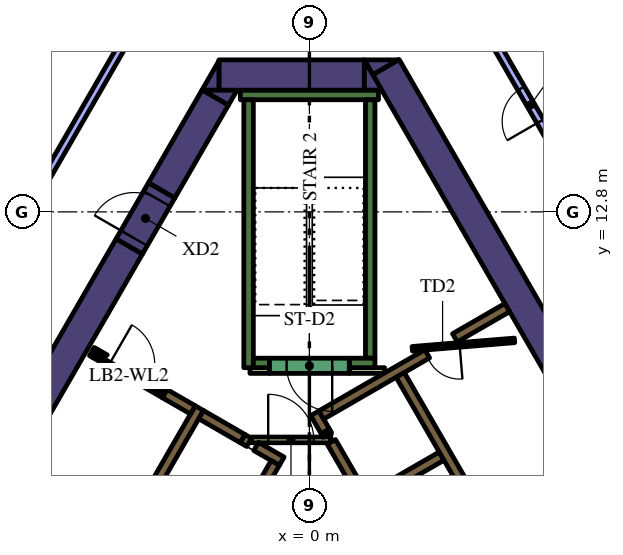
"""IFC4 building model, lengths in metres.
Left out: names, types, materials, properties, quantities, classifications, styles, units other than length and angle.
Written with IfcOpenShell. Run it as: python <this file> out.ifc"""

import sys

from ifc_helpers import new_model, si_unit, direction, frame, frame_2d, origin, place, context, subcontext, project, spatial, polyline, rectangle, outline, extrude, element, fill, save


model = new_model("IFC4")
c1 = context("Model", 3, precision=1e-05, world=origin(), true_north=direction((0.0, 1.0)))
c2 = subcontext(c1, "Body", "Model", "MODEL_VIEW")
j1 = project(units=[si_unit("LENGTHUNIT", "METRE"), si_unit("PLANEANGLEUNIT", "RADIAN")], contexts=[c1])
p1 = place(None, origin())
s1 = spatial("IfcSite", under=j1, at=p1, CompositionType="ELEMENT")
p2 = place(p1, origin())
s2 = spatial("IfcBuilding", under=s1, at=p2, CompositionType="ELEMENT")
p3 = place(p2, frame((0.0, 0.0, 175.2)))
s3 = spatial("IfcBuildingStorey", under=s2, at=p3, CompositionType="ELEMENT", Elevation=175.2)
p4 = place(p3, frame((8.279, 5.761, 0.0), z_axis=(0.0, 0.0, 1.0), x_axis=(-0.500010359015, 0.866019422922, 0.0)))
e1 = element("IfcWall", 1, at=p4, inside=s3, PredefinedType="SOLIDWALL", context=c2, shape_type="SweptSolid", body=[
    extrude(rectangle(XDim=12.528, YDim=0.8, at=frame_2d((6.264, 0.0))), origin(), (0.0, 0.0, 1.0), 4.2),
])
p5 = place(p3, origin())
e2 = element("IfcWall", 2, at=p5, inside=s3, PredefinedType="SOLIDWALL", context=c2, shape_type="SweptSolid", body=[
    extrude(outline(polyline([(1.443, 16.8), (2.339, 16.8), (1.667, 16.412), (1.443, 16.8)])), origin(), (0.0, 0.0, 1.0), 4.2),
])
p6 = place(p3, frame((-2.379, 16.4, 0.0), z_axis=(0.0, 0.0, 1.0), x_axis=(1.0, 0.0, 0.0)))
e3 = element("IfcWall", 3, at=p6, inside=s3, PredefinedType="SOLIDWALL", context=c2, shape_type="SweptSolid", body=[
    extrude(rectangle(XDim=3.824, YDim=0.8, at=frame_2d((1.912, 0.0))), origin(), (0.0, 0.0, 1.0), 4.2),
])
e4 = element("IfcWall", 4, at=p5, inside=s3, PredefinedType="SOLIDWALL", context=c2, shape_type="SweptSolid", body=[
    extrude(outline(polyline([(1.905, 16.0), (1.447, 16.0), (1.447, 16.793), (1.905, 16.0)])), origin(), (0.0, 0.0, 1.0), 4.2),
])
e5 = element("IfcWall", 5, at=p5, inside=s3, PredefinedType="SOLIDWALL", context=c2, shape_type="SweptSolid", body=[
    extrude(outline(polyline([(-2.829, 16.0), (-2.381, 16.776), (-2.381, 16.0), (-2.829, 16.0)])), origin(), (0.0, 0.0, 1.0), 4.2),
])
p7 = place(p3, frame((-2.477, 15.81, 0.0), z_axis=(0.0, 0.0, 1.0), x_axis=(-0.499969377405, -0.866043083026, 0.0)))
e6 = element("IfcWall", 6, at=p7, inside=s3, PredefinedType="SOLIDWALL", context=c2, shape_type="SweptSolid", body=[
    extrude(rectangle(XDim=2.824, YDim=0.8, at=frame_2d((1.412, 0.0))), origin(), (0.0, 0.0, 1.0), 4.2),
])
e7 = element("IfcWall", 7, at=p5, inside=s3, PredefinedType="SOLIDWALL", context=c2, shape_type="SweptSolid", body=[
    extrude(outline(polyline([(-1.905, 16.0), (-2.129, 15.612), (-2.801, 16.0), (-1.905, 16.0)])), origin(), (0.0, 0.0, 1.0), 4.2),
])
p8 = place(p3, frame((-12.668, -1.842, 0.0), z_axis=(0.0, 0.0, 1.0), x_axis=(0.500003640647, 0.866023301845, 0.0)))
e8 = element("IfcWall", 8, at=p8, inside=s3, PredefinedType="SOLIDWALL", context=c2, shape_type="SweptSolid", body=[
    extrude(rectangle(XDim=15.858, YDim=0.8, at=frame_2d((7.929, 0.0))), origin(), (0.0, 0.0, 1.0), 4.2),
])
p9 = place(p3, frame((-1.817, 15.875, 0.0), z_axis=(0.0, 0.0, 1.0), x_axis=(1.0, 0.0, 0.0)))
e9 = element("IfcWall", 9, at=p9, inside=s3, PredefinedType="SOLIDWALL", context=c2, shape_type="SweptSolid", body=[
    extrude(rectangle(XDim=3.634, YDim=0.25, at=frame_2d((1.817, 0.0))), origin(), (0.0, 0.0, 1.0), 4.2),
])
p10 = place(p3, frame((1.6, 8.95, 0.0), z_axis=(0.0, 0.0, 1.0), x_axis=(0.0, 1.0, 0.0)))
e10 = element("IfcWall", 10, at=p10, inside=s3, PredefinedType="SOLIDWALL", context=c2, shape_type="SweptSolid", body=[
    extrude(rectangle(XDim=6.8, YDim=0.25, at=frame_2d((3.4, 0.0))), origin(), (0.0, 0.0, 1.0), 4.2),
])
p11 = place(p3, frame((1.05, 8.825, 0.0), z_axis=(0.0, 0.0, 1.0), x_axis=(1.0, 0.0, 0.0)))
e11 = element("IfcWall", 11, at=p11, inside=s3, PredefinedType="SOLIDWALL", context=c2, shape_type="SweptSolid", body=[
    extrude(rectangle(XDim=0.675, YDim=0.25, at=frame_2d((0.337, 0.0))), origin(), (0.0, 0.0, 1.0), 4.2),
])
p12 = place(p3, frame((-1.6, 8.7, 0.0), z_axis=(0.0, 0.0, 1.0), x_axis=(0.0, 1.0, 0.0)))
e12 = element("IfcWall", 12, at=p12, inside=s3, PredefinedType="SOLIDWALL", context=c2, shape_type="SweptSolid", body=[
    extrude(rectangle(XDim=7.05, YDim=0.25, at=frame_2d((3.525, 0.0))), origin(), (0.0, 0.0, 1.0), 4.2),
])
p13 = place(p3, frame((-1.475, 8.825, 0.0), z_axis=(0.0, 0.0, 1.0), x_axis=(1.0, 0.0, 0.0)))
e13 = element("IfcWall", 13, at=p13, inside=s3, PredefinedType="SOLIDWALL", context=c2, shape_type="SweptSolid", body=[
    extrude(rectangle(XDim=0.425, YDim=0.25, at=frame_2d((0.212, 0.0))), origin(), (0.0, 0.0, 1.0), 4.2),
])
p14 = place(p3, frame((0.473, 6.93, 0.0), z_axis=(0.0, 0.0, 1.0), x_axis=(-0.49972245349, 0.866185586049, 0.0)))
e14 = element("IfcWall", 14, at=p14, inside=s3, PredefinedType="SOLIDWALL", context=c2, shape_type="SweptSolid", body=[
    extrude(rectangle(XDim=0.11, YDim=0.25, at=frame_2d((0.055, 0.0))), origin(), (0.0, 0.0, 1.0), 4.2),
])
p15 = place(p3, frame((6.568, -3.627, 0.0), z_axis=(0.0, 0.0, 1.0), x_axis=(-0.499999455981, 0.866025717874, 0.0)))
e15 = element("IfcWall", 15, at=p15, inside=s3, PredefinedType="SOLIDWALL", context=c2, shape_type="SweptSolid", body=[
    extrude(rectangle(XDim=11.978, YDim=0.25, at=frame_2d((5.989, 0.0))), origin(), (0.0, 0.0, 1.0), 4.2),
])
p16 = place(p3, frame((0.417, 7.027, 0.0), z_axis=(0.0, 0.0, 1.0), x_axis=(-0.500210807569, 0.865903659763, 0.0)))
e16 = element("IfcWall", 16, at=p16, inside=s3, PredefinedType="SOLIDWALL", context=c2, shape_type="SweptSolid", body=[
    extrude(rectangle(XDim=0.548, YDim=0.25, at=frame_2d((0.274, 0.0))), origin(), (0.0, 0.0, 1.0), 4.2),
])
p17 = place(p3, frame((3.1, 9.064, 0.0), z_axis=(0.0, 0.0, 1.0), x_axis=(-0.866030133475, -0.499991807846, 0.0)))
e17 = element("IfcWall", 17, at=p17, inside=s3, PredefinedType="SOLIDWALL", context=c2, shape_type="SweptSolid", body=[
    extrude(rectangle(XDim=3.217, YDim=0.25, at=frame_2d((1.608, 0.0))), origin(), (0.0, 0.0, 1.0), 4.2),
])
p18 = place(p3, frame((1.574, 5.274, 0.0), z_axis=(0.0, 0.0, 1.0), x_axis=(0.866028486751, 0.499994660107, 0.0)))
e18 = element("IfcWall", 18, at=p18, inside=s3, PredefinedType="SOLIDWALL", context=c2, shape_type="SweptSolid", body=[
    extrude(rectangle(XDim=2.2, YDim=0.25, at=frame_2d((1.1, 0.0))), origin(), (0.0, 0.0, 1.0), 4.2),
])
p19 = place(p3, frame((3.83, 9.486, 0.0), z_axis=(0.0, 0.0, 1.0), x_axis=(0.865986202621, 0.500067892261, 0.0)))
e19 = element("IfcWall", 19, at=p19, inside=s3, PredefinedType="SOLIDWALL", context=c2, shape_type="SweptSolid", body=[
    extrude(rectangle(XDim=1.591, YDim=0.25, at=frame_2d((0.795, 0.0))), origin(), (0.0, 0.0, 1.0), 4.2),
])
p20 = place(p3, frame((-8.06, -1.311, 0.0), z_axis=(0.0, 0.0, 1.0), x_axis=(0.50000273126, 0.866023826885, 0.0)))
e20 = element("IfcWall", 20, at=p20, inside=s3, PredefinedType="SOLIDWALL", context=c2, shape_type="SweptSolid", body=[
    extrude(rectangle(XDim=10.33, YDim=0.25, at=frame_2d((5.165, 0.0))), origin(), (0.0, 0.0, 1.0), 4.2),
])
p21 = place(p3, frame((-1.758, 6.835, 0.0), z_axis=(0.0, 0.0, 1.0), x_axis=(0.865982457891, -0.500074377092, 0.0)))
e21 = element("IfcWall", 21, at=p21, inside=s3, PredefinedType="SOLIDWALL", context=c2, shape_type="SweptSolid", body=[
    extrude(rectangle(XDim=0.2, YDim=0.25, at=frame_2d((0.1, 0.0))), origin(), (0.0, 0.0, 1.0), 4.2),
])
p22 = place(p3, frame((-1.76, 6.836, 0.0), z_axis=(0.0, 0.0, 1.0), x_axis=(-0.865952863304, 0.500125622755, 0.0)))
e22 = element("IfcWall", 22, at=p22, inside=s3, PredefinedType="SOLIDWALL", context=c2, shape_type="SweptSolid", body=[
    extrude(rectangle(XDim=1.258, YDim=0.25, at=frame_2d((0.629, 0.0))), origin(), (0.0, 0.0, 1.0), 4.2),
])
p23 = place(p3, frame((-0.728, 6.24, 0.0), z_axis=(0.0, 0.0, 1.0), x_axis=(-0.865955664968, 0.500120771724, 0.0)))
e23 = element("IfcWall", 23, at=p23, inside=s3, PredefinedType="SOLIDWALL", context=c2, shape_type="SweptSolid", body=[
    extrude(rectangle(XDim=0.778, YDim=0.25, at=frame_2d((0.389, 0.0))), origin(), (0.0, 0.0, 1.0), 4.2),
])
p24 = place(p3, frame((-5.725, 9.125, 0.0), z_axis=(0.0, 0.0, 1.0), x_axis=(0.866185586049, -0.49972245349, 0.0)))
e24 = element("IfcWall", 24, at=p24, inside=s3, PredefinedType="SOLIDWALL", context=c2, shape_type="SweptSolid", body=[
    extrude(rectangle(XDim=0.11, YDim=0.25, at=frame_2d((0.055, 0.0))), origin(), (0.0, 0.0, 1.0), 4.2),
])
p25 = place(p3, frame((-3.066, 7.59, 0.0), z_axis=(0.0, 0.0, 1.0), x_axis=(-0.866081358704, 0.49990307071, 0.0)))
e25 = element("IfcWall", 25, at=p25, inside=s3, PredefinedType="SOLIDWALL", context=c2, shape_type="SweptSolid", body=[
    extrude(rectangle(XDim=0.858, YDim=0.25, at=frame_2d((0.429, 0.0))), origin(), (0.0, 0.0, 1.0), 4.2),
])
e26 = element("IfcWall", 26, at=p5, inside=s3, PredefinedType="SOLIDWALL", context=c2, shape_type="SweptSolid", body=[
    extrude(outline(polyline([(-3.748, 8.128), (-3.813, 8.015), (-4.027, 8.139), (-4.017, 8.156), (-4.008, 8.173), (-4.0, 8.192), (-3.995, 8.21), (-3.991, 8.23), (-3.99, 8.25), (-3.99, 8.268), (-3.748, 8.128)])), origin(), (0.0, 0.0, 1.0), 4.2),
])
e27 = element("IfcWall", 27, at=p5, inside=s3, PredefinedType="SOLIDWALL", context=c2, shape_type="SweptSolid", body=[
    extrude(outline(polyline([(-5.689, 8.96), (-5.69, 8.961), (-5.565, 9.177), (-5.319, 9.035), (-5.335, 9.026), (-5.351, 9.015), (-5.366, 9.002), (-5.379, 8.988), (-5.392, 8.972), (-5.402, 8.956), (-5.412, 8.939), (-5.629, 9.064), (-5.629, 9.064), (-5.689, 8.96)])), origin(), (0.0, 0.0, 1.0), 4.2),
])
p26 = place(p3, frame((1.05, 8.625, 0.0), z_axis=(0.0, 0.0, 1.0), x_axis=(1.0, 0.0, 0.0)))
e28 = element("IfcWall", 28, at=p26, inside=s3, PredefinedType="PARTITIONING", context=c2, shape_type="SweptSolid", body=[
    extrude(rectangle(XDim=0.929, YDim=0.15, at=frame_2d((0.464, 0.0))), origin(), (0.0, 0.0, 1.0), 3.15),
])
p27 = place(p3, frame((-1.564, 8.625, 0.0), z_axis=(0.0, 0.0, 1.0), x_axis=(1.0, 0.0, 0.0)))
e29 = element("IfcWall", 29, at=p27, inside=s3, PredefinedType="PARTITIONING", context=c2, shape_type="SweptSolid", body=[
    extrude(rectangle(XDim=0.514, YDim=0.15, at=frame_2d((0.257, 0.0))), origin(), (0.0, 0.0, 1.0), 3.15),
])
p28 = place(p3, frame((8.565, -2.185, 0.0), z_axis=(0.0, 0.0, 1.0), x_axis=(-0.499997954832, 0.866026584559, 0.0)))
e30 = element("IfcWall", 30, at=p28, inside=s3, PredefinedType="SOLIDWALL", context=c2, shape_type="SweptSolid", body=[
    extrude(rectangle(XDim=12.35, YDim=0.25, at=frame_2d((6.175, 0.0))), origin(), (0.0, 0.0, 1.0), 4.2),
])
p29 = place(p28, frame((0.585, 0.0, 0.0)))
e31 = element("IfcOpeningElement", 31, at=p29, cuts=e30, PredefinedType="OPENING", context=c2, shape_type="SweptSolid", body=[
    extrude(rectangle(XDim=1.1, YDim=2.1, at=frame_2d((0.55, 1.05))), frame((0.0, 0.135, 0.0), z_axis=(0.0, -1.0, 0.0), x_axis=(1.0, 0.0, 0.0)), (0.0, 0.0, 1.0), 0.27),
])
p30 = place(p3, frame((-0.898, 6.194, 0.0), z_axis=(0.0, 0.0, 1.0), x_axis=(-0.499996202215, -0.866027596426, 0.0)))
e32 = element("IfcWall", 32, at=p30, inside=s3, PredefinedType="SOLIDWALL", context=c2, shape_type="SweptSolid", body=[
    extrude(rectangle(XDim=9.83, YDim=0.25, at=frame_2d((4.915, 0.0))), origin(), (0.0, 0.0, 1.0), 4.2),
])
p31 = place(p30, frame((0.585, 0.0, 0.0)))
e33 = element("IfcOpeningElement", 33, at=p31, cuts=e32, PredefinedType="OPENING", context=c2, shape_type="SweptSolid", body=[
    extrude(rectangle(XDim=1.1, YDim=2.1, at=frame_2d((0.55, 1.05))), frame((0.0, 0.135, 0.0), z_axis=(0.0, -1.0, 0.0), x_axis=(1.0, 0.0, 0.0)), (0.0, 0.0, 1.0), 0.27),
])
p32 = place(p30, frame((3.105, 0.0, 0.0)))
e34 = element("IfcOpeningElement", 34, at=p32, cuts=e32, PredefinedType="OPENING", context=c2, shape_type="SweptSolid", body=[
    extrude(rectangle(XDim=1.1, YDim=2.1, at=frame_2d((0.55, 1.05))), frame((0.0, 0.135, 0.0), z_axis=(0.0, -1.0, 0.0), x_axis=(1.0, 0.0, 0.0)), (0.0, 0.0, 1.0), 0.27),
])
p33 = place(p30, frame((5.625, 0.0, 0.0)))
e35 = element("IfcOpeningElement", 35, at=p33, cuts=e32, PredefinedType="OPENING", context=c2, shape_type="SweptSolid", body=[
    extrude(rectangle(XDim=1.1, YDim=2.1, at=frame_2d((0.55, 1.05))), frame((0.0, 0.135, 0.0), z_axis=(0.0, -1.0, 0.0), x_axis=(1.0, 0.0, 0.0)), (0.0, 0.0, 1.0), 0.27),
])
p34 = place(p30, frame((8.145, 0.0, 0.0)))
e36 = element("IfcOpeningElement", 36, at=p34, cuts=e32, PredefinedType="OPENING", context=c2, shape_type="SweptSolid", body=[
    extrude(rectangle(XDim=1.1, YDim=2.1, at=frame_2d((0.55, 1.05))), frame((0.0, 0.135, 0.0), z_axis=(0.0, -1.0, 0.0), x_axis=(1.0, 0.0, 0.0)), (0.0, 0.0, 1.0), 0.27),
])
p35 = place(p3, frame((1.05, 8.75, 0.0), z_axis=(0.0, 0.0, 1.0), x_axis=(-1.0, 0.0, 0.0)))
e37 = element("IfcWall", 37, at=p35, inside=s3, PredefinedType="SOLIDWALL", context=c2, shape_type="SweptSolid", body=[
    extrude(rectangle(XDim=2.1, YDim=0.4, at=frame_2d((1.05, 0.0))), origin(), (0.0, 0.0, 1.0), 4.2),
])
p36 = place(p35, frame((0.45, 0.0, 0.0)))
e38 = element("IfcOpeningElement", 38, at=p36, cuts=e37, PredefinedType="OPENING", context=c2, shape_type="SweptSolid", body=[
    extrude(rectangle(XDim=1.2, YDim=2.1, at=frame_2d((0.6, 1.05))), frame((0.0, 0.21, 0.0), z_axis=(0.0, -1.0, 0.0), x_axis=(1.0, 0.0, 0.0)), (0.0, 0.0, 1.0), 0.42),
])
p37 = place(p3, frame((5.398, 9.419, 0.0), z_axis=(0.0, 0.0, 1.0), x_axis=(-0.996653416376, -0.081743303248, 0.0)))
e39 = element("IfcWall", 39, at=p37, inside=s3, PredefinedType="PARTITIONING", context=c2, shape_type="SweptSolid", body=[
    extrude(rectangle(XDim=2.7, YDim=0.12, at=frame_2d((1.35, 0.0))), origin(), (0.0, 0.0, 1.0), 3.15),
])
p38 = place(p37, frame((1.45, 0.0, 0.0)))
e40 = element("IfcOpeningElement", 40, at=p38, cuts=e39, PredefinedType="OPENING", context=c2, shape_type="SweptSolid", body=[
    extrude(rectangle(XDim=0.9, YDim=2.1, at=frame_2d((0.45, 1.05))), frame((0.0, 0.07, 0.0), z_axis=(0.0, -1.0, 0.0), x_axis=(1.0, 0.0, 0.0)), (0.0, 0.0, 1.0), 0.14),
])
p39 = place(p3, frame((-1.534, 6.8, 0.0), z_axis=(0.0, 0.0, 1.0), x_axis=(1.0, 0.0, 0.0)))
e41 = element("IfcWall", 41, at=p39, inside=s3, PredefinedType="PARTITIONING", context=c2, shape_type="SweptSolid", body=[
    extrude(rectangle(XDim=2.1, YDim=0.15, at=frame_2d((1.05, 0.0))), origin(), (0.0, 0.0, 1.0), 3.15),
])
p40 = place(p39, frame((0.45, 0.0, 0.0)))
e42 = element("IfcOpeningElement", 42, at=p40, cuts=e41, PredefinedType="OPENING", context=c2, shape_type="SweptSolid", body=[
    extrude(rectangle(XDim=1.2, YDim=2.1, at=frame_2d((0.6, 1.05))), frame((0.0, 0.085, 0.0), z_axis=(0.0, -1.0, 0.0), x_axis=(1.0, 0.0, 0.0)), (0.0, 0.0, 1.0), 0.17),
])
p41 = place(p3, frame((-5.659, 9.012, 0.0), z_axis=(0.0, 0.0, 1.0), x_axis=(0.866009402589, -0.500027713859, 0.0)))
e43 = element("IfcWall", 43, at=p41, inside=s3, PredefinedType="PARTITIONING", context=c2, shape_type="SweptSolid", body=[
    extrude(rectangle(XDim=2.1, YDim=0.12, at=frame_2d((1.05, 0.0))), origin(), (0.0, 0.0, 1.0), 3.15),
])
p42 = place(p41, frame((0.45, 0.0, 0.0)))
e44 = element("IfcOpeningElement", 44, at=p42, cuts=e43, PredefinedType="OPENING", context=c2, shape_type="SweptSolid", body=[
    extrude(rectangle(XDim=1.2, YDim=2.1, at=frame_2d((0.6, 1.05))), frame((0.0, 0.07, 0.0), z_axis=(0.0, -1.0, 0.0), x_axis=(1.0, 0.0, 0.0)), (0.0, 0.0, 1.0), 0.14),
])
p43 = place(p3, frame((-4.739, 11.892, 0.0), z_axis=(0.0, 0.0, 1.0), x_axis=(0.500062241894, 0.865989465428, 0.0)))
e45 = element("IfcWall", 45, at=p43, inside=s3, PredefinedType="SOLIDWALL", context=c2, shape_type="SweptSolid", body=[
    extrude(rectangle(XDim=1.7, YDim=0.8, at=frame_2d((0.85, 0.0))), origin(), (0.0, 0.0, 1.0), 4.2),
])
p44 = place(p43, frame((0.25, 0.0, 0.0)))
e46 = element("IfcOpeningElement", 46, at=p44, cuts=e45, PredefinedType="OPENING", context=c2, shape_type="SweptSolid", body=[
    extrude(rectangle(XDim=1.2, YDim=2.1, at=frame_2d((0.6, 1.05))), frame((0.0, 0.41, 0.0), z_axis=(0.0, -1.0, 0.0), x_axis=(1.0, 0.0, 0.0)), (0.0, 0.0, 1.0), 0.82),
])
p45 = place(p3, frame((7.872, 12.064, 0.0), z_axis=(0.0, 0.0, 1.0), x_axis=(-0.499995192696, 0.866028179265, 0.0)))
e47 = element("IfcWall", 47, at=p45, inside=s3, PredefinedType="PARTITIONING", context=c2, shape_type="SweptSolid", body=[
    extrude(rectangle(XDim=8.239, YDim=0.2, at=frame_2d((4.12, 0.0))), origin(), (0.0, 0.0, 1.0), 3.15),
])
p46 = place(p45, frame((3.6, 0.0, 0.0)))
e48 = element("IfcOpeningElement", 48, at=p46, cuts=e47, PredefinedType="OPENING", context=c2, shape_type="SweptSolid", body=[
    extrude(rectangle(XDim=1.0, YDim=2.1, at=frame_2d((0.5, 1.05))), frame((0.0, 0.11, 0.0), z_axis=(0.0, -1.0, 0.0), x_axis=(1.0, 0.0, 0.0)), (0.0, 0.0, 1.0), 0.22),
])
p47 = place(p3, frame((-4.757, 17.461, 0.0), z_axis=(0.0, 0.0, 1.0), x_axis=(-0.499998278779, -0.866026397529, 0.0)))
e49 = element("IfcWall", 49, at=p47, inside=s3, PredefinedType="PARTITIONING", context=c2, shape_type="SweptSolid", body=[
    extrude(rectangle(XDim=8.709, YDim=0.2, at=frame_2d((4.354, 0.0))), origin(), (0.0, 0.0, 1.0), 3.15),
])
p48 = place(p36, origin())
e50 = element("IfcDoor", 50, at=p48, inside=s3, OperationType="SINGLE_SWING_LEFT", PredefinedType="DOOR", context=c2, shape_type="SweptSolid", body=[
    extrude(rectangle(XDim=1.2, YDim=2.1, at=frame_2d((0.6, 1.05))), frame((0.0, 0.025, 0.0), z_axis=(0.0, -1.0, 0.0), x_axis=(1.0, 0.0, 0.0)), (0.0, 0.0, 1.0), 0.05),
])
fill(e38, e50)
p49 = place(p38, origin())
e51 = element("IfcDoor", 51, at=p49, inside=s3, OperationType="SINGLE_SWING_LEFT", PredefinedType="DOOR", context=c2, shape_type="SweptSolid", body=[
    extrude(rectangle(XDim=0.9, YDim=2.1, at=frame_2d((0.45, 1.05))), frame((0.0, 0.025, 0.0), z_axis=(0.0, -1.0, 0.0), x_axis=(1.0, 0.0, 0.0)), (0.0, 0.0, 1.0), 0.05),
])
fill(e40, e51)
p50 = place(p40, origin())
e52 = element("IfcDoor", 52, at=p50, inside=s3, OperationType="SINGLE_SWING_LEFT", PredefinedType="DOOR", context=c2, shape_type="SweptSolid", body=[
    extrude(rectangle(XDim=1.2, YDim=2.1, at=frame_2d((0.6, 1.05))), frame((0.0, 0.025, 0.0), z_axis=(0.0, -1.0, 0.0), x_axis=(1.0, 0.0, 0.0)), (0.0, 0.0, 1.0), 0.05),
])
fill(e42, e52)
p51 = place(p42, origin())
e53 = element("IfcDoor", 53, at=p51, inside=s3, OperationType="SINGLE_SWING_LEFT", PredefinedType="DOOR", context=c2, shape_type="SweptSolid", body=[
    extrude(rectangle(XDim=1.2, YDim=2.1, at=frame_2d((0.6, 1.05))), frame((0.0, 0.025, 0.0), z_axis=(0.0, -1.0, 0.0), x_axis=(1.0, 0.0, 0.0)), (0.0, 0.0, 1.0), 0.05),
])
fill(e44, e53)
p52 = place(p44, origin())
e54 = element("IfcDoor", 54, at=p52, inside=s3, OperationType="SINGLE_SWING_LEFT", PredefinedType="DOOR", context=c2, shape_type="SweptSolid", body=[
    extrude(rectangle(XDim=1.2, YDim=2.1, at=frame_2d((0.6, 1.05))), frame((0.0, 0.025, 0.0), z_axis=(0.0, -1.0, 0.0), x_axis=(1.0, 0.0, 0.0)), (0.0, 0.0, 1.0), 0.05),
])
fill(e46, e54)
p53 = place(p46, origin())
e55 = element("IfcDoor", 55, at=p53, inside=s3, OperationType="SINGLE_SWING_LEFT", PredefinedType="DOOR", context=c2, shape_type="SweptSolid", body=[
    extrude(rectangle(XDim=1.0, YDim=2.1, at=frame_2d((0.5, 1.05))), frame((0.0, 0.025, 0.0), z_axis=(0.0, -1.0, 0.0), x_axis=(1.0, 0.0, 0.0)), (0.0, 0.0, 1.0), 0.05),
])
fill(e48, e55)
save(model, sys.argv[1])
